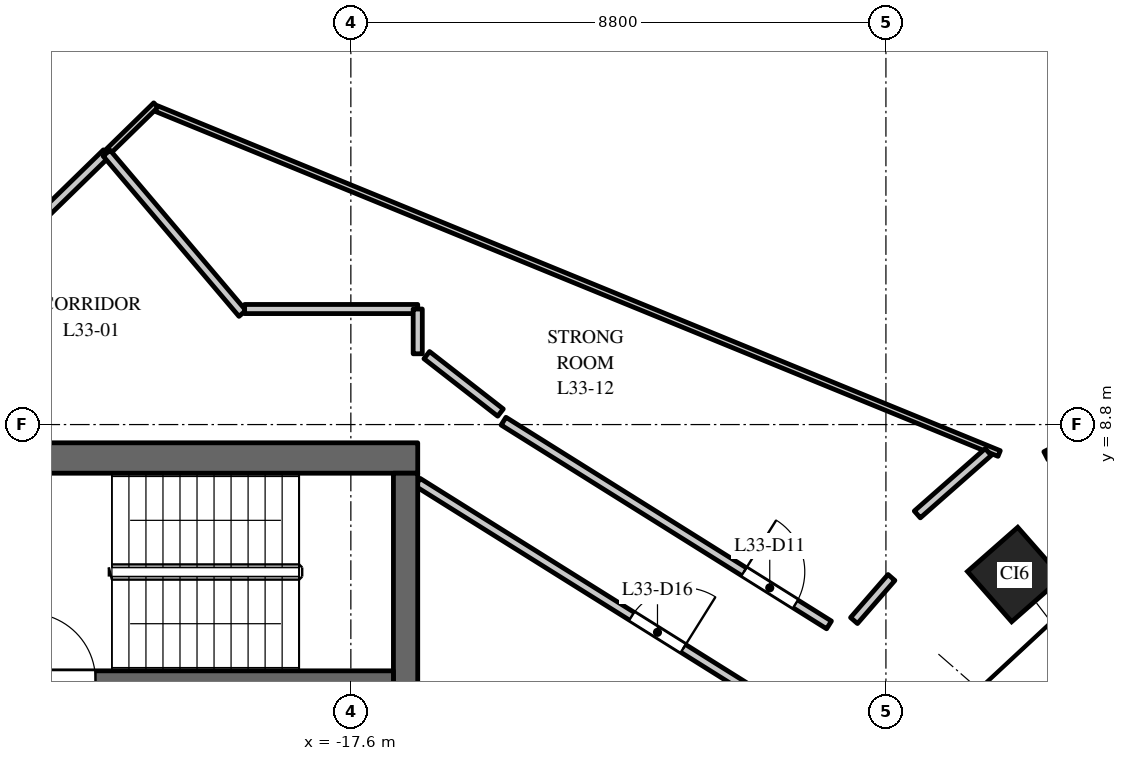
"""IFC4 building model, lengths in metres.
Left out: names, types, materials, properties, quantities, classifications, styles, units other than length and angle.
Written with IfcOpenShell. Run it as: python <this file> out.ifc"""

import sys

from ifc_helpers import new_model, si_unit, direction, frame, frame_2d, origin, origin_2d, place, context, subcontext, project, spatial, rectangle, extrude, element, fill, save


model = new_model("IFC4")
c1 = context("Model", 3, precision=1e-05, world=origin(), true_north=direction((0.0, 1.0)))
c2 = subcontext(c1, "Body", "Model", "MODEL_VIEW")
j1 = project(units=[si_unit("LENGTHUNIT", "METRE"), si_unit("PLANEANGLEUNIT", "RADIAN")], contexts=[c1])
p1 = place(None, origin())
s1 = spatial("IfcSite", under=j1, at=p1, CompositionType="ELEMENT")
p2 = place(p1, origin())
s2 = spatial("IfcBuilding", under=s1, at=p2, CompositionType="ELEMENT")
p3 = place(p2, frame((0.0, 0.0, 146.0)))
s3 = spatial("IfcBuildingStorey", under=s2, at=p3, CompositionType="ELEMENT", Elevation=146.0)
p4 = place(p3, frame((-6.682, 6.334, 0.0), z_axis=(0.0, 0.0, 1.0), x_axis=(-0.75102249095, -0.660276622399, 0.0)))
e1 = element("IfcColumn", 1, at=p4, inside=s3, PredefinedType="COLUMN", context=c2, shape_type="SweptSolid", body=[
    extrude(rectangle(XDim=1.1, YDim=1.1, at=origin_2d()), origin(), (0.0, 0.0, 1.0), 4.0),
])
p5 = place(p3, frame((-16.5, 8.25, 0.0), z_axis=(0.0, 0.0, 1.0), x_axis=(-1.0, 0.0, 0.0)))
e2 = element("IfcWall", 2, at=p5, inside=s3, PredefinedType="SHEAR", context=c2, shape_type="SweptSolid", body=[
    extrude(rectangle(XDim=15.0, YDim=0.5, at=frame_2d((7.5, 0.0))), origin(), (0.0, 0.0, 1.0), 3.7),
])
p6 = place(p5, frame((6.9, 0.0, 0.0)))
e3 = element("IfcOpeningElement", 3, at=p6, cuts=e2, PredefinedType="OPENING", context=c2, shape_type="SweptSolid", body=[
    extrude(rectangle(XDim=1.2, YDim=2.1, at=frame_2d((0.6, 1.05))), frame((0.0, 0.26, 0.0), z_axis=(0.0, -1.0, 0.0), x_axis=(1.0, 0.0, 0.0)), (0.0, 0.0, 1.0), 0.52),
])
p7 = place(p5, frame((12.95, 0.0, 0.0)))
e4 = element("IfcOpeningElement", 4, at=p7, cuts=e2, PredefinedType="OPENING", context=c2, shape_type="SweptSolid", body=[
    extrude(rectangle(XDim=0.9, YDim=2.1, at=frame_2d((0.45, 1.05))), frame((0.0, 0.26, 0.0), z_axis=(0.0, -1.0, 0.0), x_axis=(1.0, 0.0, 0.0)), (0.0, 0.0, 1.0), 0.52),
])
p8 = place(p3, frame((-16.7, -8.0, 0.0), z_axis=(0.0, 0.0, 1.0), x_axis=(0.0, 1.0, 0.0)))
e5 = element("IfcWall", 5, at=p8, inside=s3, PredefinedType="SHEAR", context=c2, shape_type="SweptSolid", body=[
    extrude(rectangle(XDim=16.0, YDim=0.4, at=frame_2d((8.0, 0.0))), origin(), (0.0, 0.0, 1.0), 3.7),
])
p9 = place(p3, frame((-16.9, 4.6, 0.0), z_axis=(0.0, 0.0, 1.0), x_axis=(-1.0, 0.0, 0.0)))
e6 = element("IfcWall", 6, at=p9, inside=s3, PredefinedType="SHEAR", context=c2, shape_type="SweptSolid", body=[
    extrude(rectangle(XDim=6.18, YDim=0.3, at=frame_2d((3.09, 0.0))), origin(), (0.0, 0.0, 1.0), 3.7),
])
p10 = place(p9, frame((4.9, 0.0, 0.0)))
e7 = element("IfcOpeningElement", 7, at=p10, cuts=e6, PredefinedType="OPENING", context=c2, shape_type="SweptSolid", body=[
    extrude(rectangle(XDim=1.1, YDim=2.1, at=frame_2d((0.55, 1.05))), frame((0.0, 0.16, 0.0), z_axis=(0.0, -1.0, 0.0), x_axis=(1.0, 0.0, 0.0)), (0.0, 0.0, 1.0), 0.32),
])
p11 = place(p3, frame((-24.166, 10.778, 0.0), z_axis=(0.0, 0.0, 1.0), x_axis=(0.715930732039, 0.698171316313, 0.0)))
e8 = element("IfcWall", 8, at=p11, inside=s3, PredefinedType="PARTITIONING", context=c2, shape_type="SweptSolid", body=[
    extrude(rectangle(XDim=3.561, YDim=0.15, at=frame_2d((1.78, 0.0))), origin(), (0.0, 0.0, 1.0), 3.7),
])
p12 = place(p3, frame((-21.617, 13.264, 0.0), z_axis=(0.0, 0.0, 1.0), x_axis=(0.715466412744, 0.698647129985, 0.0)))
e9 = element("IfcWall", 9, at=p12, inside=s3, PredefinedType="PARTITIONING", context=c2, shape_type="SweptSolid", body=[
    extrude(rectangle(XDim=1.132, YDim=0.1, at=frame_2d((0.566, 0.0))), origin(), (0.0, 0.0, 1.0), 3.7),
])
p13 = place(p3, frame((-21.617, 13.264, 0.0), z_axis=(0.0, 0.0, 1.0), x_axis=(0.646521695402, -0.762895600574, 0.0)))
e10 = element("IfcWall", 10, at=p13, inside=s3, PredefinedType="PARTITIONING", context=c2, shape_type="SweptSolid", body=[
    extrude(rectangle(XDim=3.455, YDim=0.15, at=frame_2d((1.728, 0.0))), origin(), (0.0, 0.0, 1.0), 3.7),
])
p14 = place(p3, frame((-20.796, 13.996, 0.0), z_axis=(0.0, 0.0, 1.0), x_axis=(0.925477336125, -0.378802983514, 0.0)))
e11 = element("IfcWall", 11, at=p14, inside=s3, PredefinedType="PARTITIONING", context=c2, shape_type="SweptSolid", body=[
    extrude(rectangle(XDim=14.974, YDim=0.1, at=frame_2d((7.487, 0.0))), origin(), (0.0, 0.0, 1.0), 2.75),
])
p15 = place(p3, frame((-19.347, 10.7, 0.0), z_axis=(0.0, 0.0, 1.0), x_axis=(1.0, 0.0, 0.0)))
e12 = element("IfcWall", 12, at=p15, inside=s3, PredefinedType="PARTITIONING", context=c2, shape_type="SweptSolid", body=[
    extrude(rectangle(XDim=2.847, YDim=0.15, at=frame_2d((1.423, 0.0))), origin(), (0.0, 0.0, 1.0), 3.7),
])
p16 = place(p3, frame((-16.5, 9.964, 0.0), z_axis=(0.0, 0.0, 1.0), x_axis=(0.0, 1.0, 0.0)))
e13 = element("IfcWall", 13, at=p16, inside=s3, PredefinedType="PARTITIONING", context=c2, shape_type="SweptSolid", body=[
    extrude(rectangle(XDim=0.736, YDim=0.15, at=frame_2d((0.368, 0.0))), origin(), (0.0, 0.0, 1.0), 3.7),
])
p17 = place(p3, frame((-16.5, 7.851, 0.0), z_axis=(0.0, 0.0, 1.0), x_axis=(0.847690706888, -0.530490777917, 0.0)))
e14 = element("IfcWall", 14, at=p17, inside=s3, PredefinedType="PARTITIONING", context=c2, shape_type="SweptSolid", body=[
    extrude(rectangle(XDim=6.781, YDim=0.15, at=frame_2d((3.39, 0.0))), origin(), (0.0, 0.0, 1.0), 3.7),
])
p18 = place(p17, frame((4.151, 0.0, 0.0)))
e15 = element("IfcOpeningElement", 15, at=p18, cuts=e14, PredefinedType="OPENING", context=c2, shape_type="SweptSolid", body=[
    extrude(rectangle(XDim=1.0, YDim=2.1, at=frame_2d((0.5, 1.05))), frame((0.0, 0.085, 0.0), z_axis=(0.0, -1.0, 0.0), x_axis=(1.0, 0.0, 0.0)), (0.0, 0.0, 1.0), 0.17),
])
p19 = place(p3, frame((-15.089, 8.856, 0.0), z_axis=(0.0, 0.0, 1.0), x_axis=(0.847611500167, -0.53061732424, 0.0)))
e16 = element("IfcWall", 16, at=p19, inside=s3, PredefinedType="PARTITIONING", context=c2, shape_type="SweptSolid", body=[
    extrude(rectangle(XDim=6.315, YDim=0.15, at=frame_2d((3.158, 0.0))), origin(), (0.0, 0.0, 1.0), 3.7),
])
p20 = place(p19, frame((4.665, 0.0, 0.0)))
e17 = element("IfcOpeningElement", 17, at=p20, cuts=e16, PredefinedType="OPENING", context=c2, shape_type="SweptSolid", body=[
    extrude(rectangle(XDim=1.0, YDim=2.1, at=frame_2d((0.5, 1.05))), frame((0.0, 0.085, 0.0), z_axis=(0.0, -1.0, 0.0), x_axis=(1.0, 0.0, 0.0)), (0.0, 0.0, 1.0), 0.17),
])
p21 = place(p3, frame((-9.325, 5.577, 0.0), z_axis=(0.0, 0.0, 1.0), x_axis=(0.656365478363, 0.754443078578, 0.0)))
e18 = element("IfcWall", 18, at=p21, inside=s3, PredefinedType="PARTITIONING", context=c2, shape_type="SweptSolid", body=[
    extrude(rectangle(XDim=0.938, YDim=0.15, at=frame_2d((0.469, 0.0))), origin(), (0.0, 0.0, 1.0), 2.75),
])
p22 = place(p3, frame((-8.284, 7.322, 0.0), z_axis=(0.0, 0.0, 1.0), x_axis=(0.750666784408, 0.660680996235, 0.0)))
e19 = element("IfcWall", 19, at=p22, inside=s3, PredefinedType="PARTITIONING", context=c2, shape_type="SweptSolid", body=[
    extrude(rectangle(XDim=1.555, YDim=0.15, at=frame_2d((0.777, 0.0))), origin(), (0.0, 0.0, 1.0), 3.7),
])
p23 = place(p3, frame((-6.168, 8.287, 0.0), z_axis=(0.0, 0.0, 1.0), x_axis=(0.889398654128, 0.457132403178, 0.0)))
e20 = element("IfcWall", 20, at=p23, inside=s3, PredefinedType="PARTITIONING", context=c2, shape_type="SweptSolid", body=[
    extrude(rectangle(XDim=0.844, YDim=0.15, at=frame_2d((0.422, 0.0))), origin(), (0.0, 0.0, 1.0), 3.7),
])
p24 = place(p3, frame((-16.352, 9.942, 0.0), z_axis=(0.0, 0.0, 1.0), x_axis=(0.788950226826, -0.614457109643, 0.0)))
e21 = element("IfcWall", 21, at=p24, inside=s3, PredefinedType="PARTITIONING", context=c2, shape_type="SweptSolid", body=[
    extrude(rectangle(XDim=1.538, YDim=0.15, at=frame_2d((0.769, 0.0))), origin(), (0.0, 0.0, 1.0), 3.7),
])
p25 = place(p10, origin())
e22 = element("IfcDoor", 22, at=p25, inside=s3, OperationType="SINGLE_SWING_RIGHT", PredefinedType="DOOR", context=c2, shape_type="SweptSolid", body=[
    extrude(rectangle(XDim=1.1, YDim=2.1, at=frame_2d((0.55, 1.05))), frame((0.0, 0.025, 0.0), z_axis=(0.0, -1.0, 0.0), x_axis=(1.0, 0.0, 0.0)), (0.0, 0.0, 1.0), 0.05),
])
fill(e7, e22)
p26 = place(p20, origin())
e23 = element("IfcDoor", 23, at=p26, inside=s3, OperationType="SINGLE_SWING_LEFT", PredefinedType="DOOR", context=c2, shape_type="SweptSolid", body=[
    extrude(rectangle(XDim=1.0, YDim=2.1, at=frame_2d((0.5, 1.05))), frame((0.0, 0.025, 0.0), z_axis=(0.0, -1.0, 0.0), x_axis=(1.0, 0.0, 0.0)), (0.0, 0.0, 1.0), 0.05),
])
fill(e17, e23)
p27 = place(p18, origin())
e24 = element("IfcDoor", 24, at=p27, inside=s3, OperationType="SINGLE_SWING_RIGHT", PredefinedType="DOOR", context=c2, shape_type="SweptSolid", body=[
    extrude(rectangle(XDim=1.0, YDim=2.1, at=frame_2d((0.5, 1.05))), frame((0.0, 0.025, 0.0), z_axis=(0.0, -1.0, 0.0), x_axis=(1.0, 0.0, 0.0)), (0.0, 0.0, 1.0), 0.05),
])
fill(e15, e24)
save(model, sys.argv[1])
